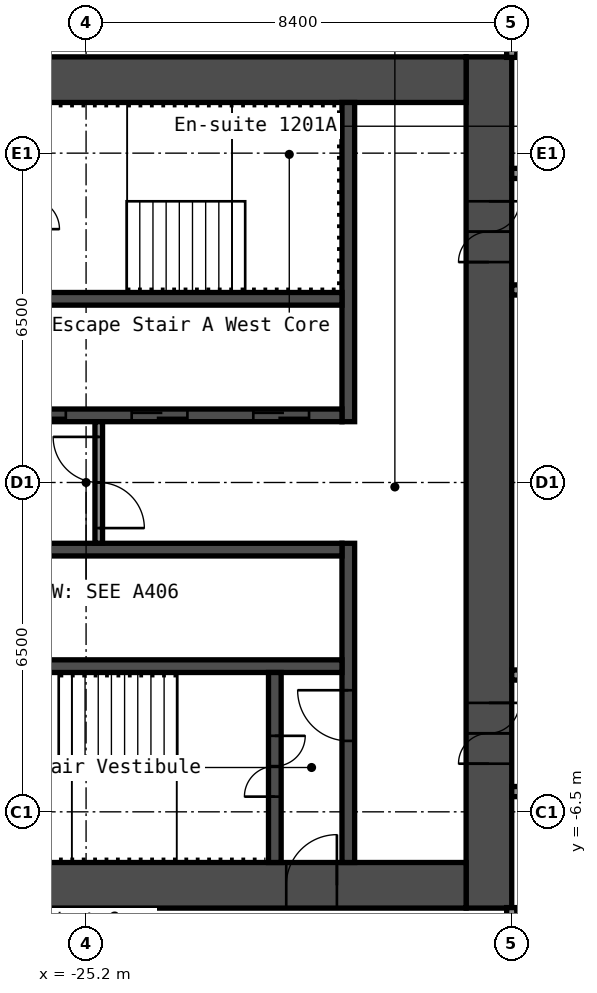
"""IFC4 building model, lengths in metres.
Left out: names, types, materials, properties, quantities, classifications, styles, units other than length and angle.
Written with IfcOpenShell. Run it as: python <this file> out.ifc"""

import sys

from ifc_helpers import new_model, si_unit, direction, frame, frame_2d, origin, place, context, subcontext, project, spatial, rectangle, extrude, element, fill, save


model = new_model("IFC4")
c1 = context("Model", 3, precision=1e-05, world=origin(), true_north=direction((0.0, 1.0)))
c2 = subcontext(c1, "Body", "Model", "MODEL_VIEW")
j1 = project(units=[si_unit("LENGTHUNIT", "METRE"), si_unit("PLANEANGLEUNIT", "RADIAN")], contexts=[c1])
p1 = place(None, origin())
s1 = spatial("IfcSite", under=j1, at=p1, CompositionType="ELEMENT")
p2 = place(p1, origin())
s2 = spatial("IfcBuilding", under=s1, at=p2, CompositionType="ELEMENT")
p3 = place(p2, frame((0.0, 0.0, 45.4)))
s3 = spatial("IfcBuildingStorey", under=s2, at=p3, CompositionType="ELEMENT", Elevation=45.4)
p4 = place(p3, frame((-17.25, -8.4, 0.0), z_axis=(0.0, 0.0, 1.0), x_axis=(0.0, 1.0, 0.0)))
e1 = element("IfcWall", 1, at=p4, inside=s3, PredefinedType="SHEAR", context=c2, shape_type="SweptSolid", body=[
    extrude(rectangle(XDim=16.8, YDim=0.9, at=frame_2d((8.4, 0.0))), origin(), (0.0, 0.0, 1.0), 2.8),
])
p5 = place(p4, frame((12.75, 0.0, 0.0)))
e2 = element("IfcOpeningElement", 2, at=p5, cuts=e1, PredefinedType="OPENING", context=c2, shape_type="SweptSolid", body=[
    extrude(rectangle(XDim=1.2, YDim=2.1, at=frame_2d((0.6, 1.05))), frame((0.0, 0.46, 0.0), z_axis=(0.0, -1.0, 0.0), x_axis=(1.0, 0.0, 0.0)), (0.0, 0.0, 1.0), 0.92),
])
p6 = place(p4, frame((2.85, 0.0, 0.0)))
e3 = element("IfcOpeningElement", 3, at=p6, cuts=e1, PredefinedType="OPENING", context=c2, shape_type="SweptSolid", body=[
    extrude(rectangle(XDim=1.2, YDim=2.1, at=frame_2d((0.6, 1.05))), frame((0.0, 0.46, 0.0), z_axis=(0.0, -1.0, 0.0), x_axis=(1.0, 0.0, 0.0)), (0.0, 0.0, 1.0), 0.92),
])
p7 = place(p3, frame((-32.7, 7.95, 0.0), z_axis=(0.0, 0.0, 1.0), x_axis=(1.0, 0.0, 0.0)))
e4 = element("IfcWall", 4, at=p7, inside=s3, PredefinedType="SHEAR", context=c2, shape_type="SweptSolid", body=[
    extrude(rectangle(XDim=15.0, YDim=0.9, at=frame_2d((7.5, 0.0))), origin(), (0.0, 0.0, 1.0), 2.8),
])
p8 = place(p7, frame((3.4, 0.0, 0.0)))
e5 = element("IfcOpeningElement", 5, at=p8, cuts=e4, PredefinedType="OPENING", context=c2, shape_type="SweptSolid", body=[
    extrude(rectangle(XDim=1.2, YDim=2.1, at=frame_2d((0.6, 1.05))), frame((0.0, 0.46, 0.0), z_axis=(0.0, -1.0, 0.0), x_axis=(1.0, 0.0, 0.0)), (0.0, 0.0, 1.0), 0.92),
])
p9 = place(p7, frame((0.75, 0.0, 0.0)))
e6 = element("IfcOpeningElement", 6, at=p9, cuts=e4, PredefinedType="OPENING", context=c2, shape_type="SweptSolid", body=[
    extrude(rectangle(XDim=0.9, YDim=2.1, at=frame_2d((0.45, 1.05))), frame((0.0, 0.46, 0.0), z_axis=(0.0, -1.0, 0.0), x_axis=(1.0, 0.0, 0.0)), (0.0, 0.0, 1.0), 0.92),
])
p10 = place(p3, frame((-32.7, -7.95, 0.0), z_axis=(0.0, 0.0, 1.0), x_axis=(1.0, 0.0, 0.0)))
e7 = element("IfcWall", 7, at=p10, inside=s3, PredefinedType="SHEAR", context=c2, shape_type="SweptSolid", body=[
    extrude(rectangle(XDim=15.0, YDim=0.9, at=frame_2d((7.5, 0.0))), origin(), (0.0, 0.0, 1.0), 2.8),
])
p11 = place(p10, frame((11.45, 0.0, 0.0)))
e8 = element("IfcOpeningElement", 8, at=p11, cuts=e7, PredefinedType="OPENING", context=c2, shape_type="SweptSolid", body=[
    extrude(rectangle(XDim=1.0, YDim=2.1, at=frame_2d((0.5, 1.05))), frame((0.0, 0.46, 0.0), z_axis=(0.0, -1.0, 0.0), x_axis=(1.0, 0.0, 0.0)), (0.0, 0.0, 1.0), 0.92),
])
p12 = place(p3, frame((-20.025, 1.2, 0.0), z_axis=(0.0, 0.0, 1.0), x_axis=(0.0, 1.0, 0.0)))
e9 = element("IfcWall", 9, at=p12, inside=s3, PredefinedType="SHEAR", context=c2, shape_type="SweptSolid", body=[
    extrude(rectangle(XDim=6.3, YDim=0.25, at=frame_2d((3.15, 0.0))), origin(), (0.0, 0.0, 1.0), 2.8),
])
p13 = place(p3, frame((-20.025, -7.5, 0.0), z_axis=(0.0, 0.0, 1.0), x_axis=(0.0, 1.0, 0.0)))
e10 = element("IfcWall", 10, at=p13, inside=s3, PredefinedType="SHEAR", context=c2, shape_type="SweptSolid", body=[
    extrude(rectangle(XDim=6.3, YDim=0.25, at=frame_2d((3.15, 0.0))), origin(), (0.0, 0.0, 1.0), 2.8),
])
p14 = place(p13, frame((2.4, 0.0, 0.0)))
e11 = element("IfcOpeningElement", 11, at=p14, cuts=e10, PredefinedType="OPENING", context=c2, shape_type="SweptSolid", body=[
    extrude(rectangle(XDim=1.0, YDim=2.1, at=frame_2d((0.5, 1.05))), frame((0.0, 0.135, 0.0), z_axis=(0.0, -1.0, 0.0), x_axis=(1.0, 0.0, 0.0)), (0.0, 0.0, 1.0), 0.27),
])
p15 = place(p3, frame((-27.65, 1.325, 0.0), z_axis=(0.0, 0.0, 1.0), x_axis=(1.0, 0.0, 0.0)))
e12 = element("IfcWall", 12, at=p15, inside=s3, PredefinedType="SHEAR", context=c2, shape_type="SweptSolid", body=[
    extrude(rectangle(XDim=7.5, YDim=0.25, at=frame_2d((3.75, 0.0))), origin(), (0.0, 0.0, 1.0), 2.8),
])
p16 = place(p15, frame((5.75, 0.0, 0.0)))
e13 = element("IfcOpeningElement", 13, at=p16, cuts=e12, PredefinedType="OPENING", context=c2, shape_type="SweptSolid", body=[
    extrude(rectangle(XDim=1.1, YDim=2.1, at=frame_2d((0.55, 1.05))), frame((0.0, 0.135, 0.0), z_axis=(0.0, -1.0, 0.0), x_axis=(1.0, 0.0, 0.0)), (0.0, 0.0, 1.0), 0.27),
])
p17 = place(p15, frame((3.35, 0.0, 0.0)))
e14 = element("IfcOpeningElement", 14, at=p17, cuts=e12, PredefinedType="OPENING", context=c2, shape_type="SweptSolid", body=[
    extrude(rectangle(XDim=1.1, YDim=2.1, at=frame_2d((0.55, 1.05))), frame((0.0, 0.135, 0.0), z_axis=(0.0, -1.0, 0.0), x_axis=(1.0, 0.0, 0.0)), (0.0, 0.0, 1.0), 0.27),
])
p18 = place(p15, frame((0.95, 0.0, 0.0)))
e15 = element("IfcOpeningElement", 15, at=p18, cuts=e12, PredefinedType="OPENING", context=c2, shape_type="SweptSolid", body=[
    extrude(rectangle(XDim=1.1, YDim=2.1, at=frame_2d((0.55, 1.05))), frame((0.0, 0.135, 0.0), z_axis=(0.0, -1.0, 0.0), x_axis=(1.0, 0.0, 0.0)), (0.0, 0.0, 1.0), 0.27),
])
for number, where, z_axis, x_axis in (
    (16, (-27.65, 3.625, 0.0), (0.0, 0.0, 1.0), (1.0, 0.0, 0.0)),
    (17, (-27.65, -1.325, 0.0), (0.0, 0.0, 1.0), (1.0, 0.0, 0.0)),
    (18, (-27.65, -3.625, 0.0), (0.0, 0.0, 1.0), (1.0, 0.0, 0.0)),
):
    element("IfcWall", number, at=place(p3, frame(where, z_axis=z_axis, x_axis=x_axis)), inside=s3, PredefinedType="SHEAR", context=c2, shape_type="SweptSolid", body=[
        extrude(rectangle(XDim=7.5, YDim=0.25, at=frame_2d((3.75, 0.0))), origin(), (0.0, 0.0, 1.0), 2.8),
    ])
p19 = place(p3, frame((-21.475, -7.5, 0.0), z_axis=(0.0, 0.0, 1.0), x_axis=(0.0, 1.0, 0.0)))
e19 = element("IfcWall", 19, at=p19, inside=s3, PredefinedType="SHEAR", context=c2, shape_type="SweptSolid", body=[
    extrude(rectangle(XDim=3.75, YDim=0.25, at=frame_2d((1.875, 0.0))), origin(), (0.0, 0.0, 1.0), 2.8),
])
p20 = place(p19, frame((1.3, 0.0, 0.0)))
e20 = element("IfcOpeningElement", 20, at=p20, cuts=e19, PredefinedType="OPENING", context=c2, shape_type="SweptSolid", body=[
    extrude(rectangle(XDim=1.2, YDim=2.1, at=frame_2d((0.6, 1.05))), frame((0.0, 0.135, 0.0), z_axis=(0.0, -1.0, 0.0), x_axis=(1.0, 0.0, 0.0)), (0.0, 0.0, 1.0), 0.27),
])
p21 = place(p3, frame((-24.95, -1.2, 0.0), z_axis=(0.0, 0.0, 1.0), x_axis=(0.0, 1.0, 0.0)))
e21 = element("IfcWall", 21, at=p21, inside=s3, PredefinedType="PARTITIONING", context=c2, shape_type="SweptSolid", body=[
    extrude(rectangle(XDim=2.4, YDim=0.15, at=frame_2d((1.2, 0.0))), origin(), (0.0, 0.0, 1.0), 2.8),
])
p22 = place(p21, frame((0.3, 0.0, 0.0)))
e22 = element("IfcOpeningElement", 22, at=p22, cuts=e21, PredefinedType="OPENING", context=c2, shape_type="SweptSolid", body=[
    extrude(rectangle(XDim=1.8, YDim=2.1, at=frame_2d((0.9, 1.05))), frame((0.0, 0.085, 0.0), z_axis=(0.0, -1.0, 0.0), x_axis=(1.0, 0.0, 0.0)), (0.0, 0.0, 1.0), 0.17),
])
p23 = place(p3, frame((-16.8, -6.1, 0.0), z_axis=(0.0, 0.0, 1.0), x_axis=(1.0, 0.0, 0.0)))
e23 = element("IfcWall", 23, at=p23, inside=s3, PredefinedType="PARTITIONING", context=c2, shape_type="SweptSolid", body=[
    extrude(rectangle(XDim=33.6, YDim=0.2, at=frame_2d((16.8, 0.0))), origin(), (0.0, 0.0, 1.0), 2.8),
])
p24 = place(p23, frame((2.85, 0.0, 0.0)))
e24 = element("IfcOpeningElement", 24, at=p24, cuts=e23, PredefinedType="OPENING", context=c2, shape_type="SweptSolid", body=[
    extrude(rectangle(XDim=1.0, YDim=2.1, at=frame_2d((0.5, 1.05))), frame((0.0, 0.11, 0.0), z_axis=(0.0, -1.0, 0.0), x_axis=(1.0, 0.0, 0.0)), (0.0, 0.0, 1.0), 0.22),
])
p25 = place(p23, frame((4.55, 0.0, 0.0)))
e25 = element("IfcOpeningElement", 25, at=p25, cuts=e23, PredefinedType="OPENING", context=c2, shape_type="SweptSolid", body=[
    extrude(rectangle(XDim=1.0, YDim=2.1, at=frame_2d((0.5, 1.05))), frame((0.0, 0.11, 0.0), z_axis=(0.0, -1.0, 0.0), x_axis=(1.0, 0.0, 0.0)), (0.0, 0.0, 1.0), 0.22),
])
p26 = place(p23, frame((10.3, 0.0, 0.0)))
e26 = element("IfcOpeningElement", 26, at=p26, cuts=e23, PredefinedType="OPENING", context=c2, shape_type="SweptSolid", body=[
    extrude(rectangle(XDim=0.9, YDim=2.1, at=frame_2d((0.45, 1.05))), frame((0.0, 0.11, 0.0), z_axis=(0.0, -1.0, 0.0), x_axis=(1.0, 0.0, 0.0)), (0.0, 0.0, 1.0), 0.22),
])
p27 = place(p23, frame((14.5, 0.0, 0.0)))
e27 = element("IfcOpeningElement", 27, at=p27, cuts=e23, PredefinedType="OPENING", context=c2, shape_type="SweptSolid", body=[
    extrude(rectangle(XDim=0.9, YDim=2.1, at=frame_2d((0.45, 1.05))), frame((0.0, 0.11, 0.0), z_axis=(0.0, -1.0, 0.0), x_axis=(1.0, 0.0, 0.0)), (0.0, 0.0, 1.0), 0.22),
])
p28 = place(p23, frame((19.65, 0.0, 0.0)))
e28 = element("IfcOpeningElement", 28, at=p28, cuts=e23, PredefinedType="OPENING", context=c2, shape_type="SweptSolid", body=[
    extrude(rectangle(XDim=1.0, YDim=2.1, at=frame_2d((0.5, 1.05))), frame((0.0, 0.11, 0.0), z_axis=(0.0, -1.0, 0.0), x_axis=(1.0, 0.0, 0.0)), (0.0, 0.0, 1.0), 0.22),
])
p29 = place(p23, frame((21.35, 0.0, 0.0)))
e29 = element("IfcOpeningElement", 29, at=p29, cuts=e23, PredefinedType="OPENING", context=c2, shape_type="SweptSolid", body=[
    extrude(rectangle(XDim=1.0, YDim=2.1, at=frame_2d((0.5, 1.05))), frame((0.0, 0.11, 0.0), z_axis=(0.0, -1.0, 0.0), x_axis=(1.0, 0.0, 0.0)), (0.0, 0.0, 1.0), 0.22),
])
p30 = place(p23, frame((30.6, 0.0, 0.0)))
e30 = element("IfcOpeningElement", 30, at=p30, cuts=e23, PredefinedType="OPENING", context=c2, shape_type="SweptSolid", body=[
    extrude(rectangle(XDim=1.0, YDim=2.1, at=frame_2d((0.5, 1.05))), frame((0.0, 0.11, 0.0), z_axis=(0.0, -1.0, 0.0), x_axis=(1.0, 0.0, 0.0)), (0.0, 0.0, 1.0), 0.22),
])
p31 = place(p3, frame((-16.8, -3.8, 0.0), z_axis=(0.0, 0.0, 1.0), x_axis=(1.0, 0.0, 0.0)))
e31 = element("IfcWall", 31, at=p31, inside=s3, PredefinedType="PARTITIONING", context=c2, shape_type="SweptSolid", body=[
    extrude(rectangle(XDim=33.6, YDim=0.2, at=frame_2d((16.8, 0.0))), origin(), (0.0, 0.0, 1.0), 2.8),
])
p32 = place(p31, frame((9.63, 0.0, 0.0)))
e32 = element("IfcOpeningElement", 32, at=p32, cuts=e31, PredefinedType="OPENING", context=c2, shape_type="SweptSolid", body=[
    extrude(rectangle(XDim=0.9, YDim=2.1, at=frame_2d((0.45, 1.05))), frame((0.0, 0.11, 0.0), z_axis=(0.0, -1.0, 0.0), x_axis=(1.0, 0.0, 0.0)), (0.0, 0.0, 1.0), 0.22),
])
p33 = place(p31, frame((13.83, 0.0, 0.0)))
e33 = element("IfcOpeningElement", 33, at=p33, cuts=e31, PredefinedType="OPENING", context=c2, shape_type="SweptSolid", body=[
    extrude(rectangle(XDim=0.9, YDim=2.1, at=frame_2d((0.45, 1.05))), frame((0.0, 0.11, 0.0), z_axis=(0.0, -1.0, 0.0), x_axis=(1.0, 0.0, 0.0)), (0.0, 0.0, 1.0), 0.22),
])
p34 = place(p31, frame((27.02, 0.0, 0.0)))
e34 = element("IfcOpeningElement", 34, at=p34, cuts=e31, PredefinedType="OPENING", context=c2, shape_type="SweptSolid", body=[
    extrude(rectangle(XDim=0.9, YDim=2.1, at=frame_2d((0.45, 1.05))), frame((0.0, 0.11, 0.0), z_axis=(0.0, -1.0, 0.0), x_axis=(1.0, 0.0, 0.0)), (0.0, 0.0, 1.0), 0.22),
])
p35 = place(p31, frame((31.22, 0.0, 0.0)))
e35 = element("IfcOpeningElement", 35, at=p35, cuts=e31, PredefinedType="OPENING", context=c2, shape_type="SweptSolid", body=[
    extrude(rectangle(XDim=0.9, YDim=2.1, at=frame_2d((0.45, 1.05))), frame((0.0, 0.11, 0.0), z_axis=(0.0, -1.0, 0.0), x_axis=(1.0, 0.0, 0.0)), (0.0, 0.0, 1.0), 0.22),
])
p36 = place(p3, frame((-16.8, 3.8, 0.0), z_axis=(0.0, 0.0, 1.0), x_axis=(1.0, 0.0, 0.0)))
e36 = element("IfcWall", 36, at=p36, inside=s3, PredefinedType="PARTITIONING", context=c2, shape_type="SweptSolid", body=[
    extrude(rectangle(XDim=33.6, YDim=0.2, at=frame_2d((16.8, 0.0))), origin(), (0.0, 0.0, 1.0), 2.8),
])
p37 = place(p36, frame((2.07, 0.0, 0.0)))
e37 = element("IfcOpeningElement", 37, at=p37, cuts=e36, PredefinedType="OPENING", context=c2, shape_type="SweptSolid", body=[
    extrude(rectangle(XDim=0.9, YDim=2.1, at=frame_2d((0.45, 1.05))), frame((0.0, 0.11, 0.0), z_axis=(0.0, -1.0, 0.0), x_axis=(1.0, 0.0, 0.0)), (0.0, 0.0, 1.0), 0.22),
])
p38 = place(p36, frame((6.27, 0.0, 0.0)))
e38 = element("IfcOpeningElement", 38, at=p38, cuts=e36, PredefinedType="OPENING", context=c2, shape_type="SweptSolid", body=[
    extrude(rectangle(XDim=0.9, YDim=2.1, at=frame_2d((0.45, 1.05))), frame((0.0, 0.11, 0.0), z_axis=(0.0, -1.0, 0.0), x_axis=(1.0, 0.0, 0.0)), (0.0, 0.0, 1.0), 0.22),
])
p39 = place(p36, frame((18.115, 0.0, 0.0)))
e39 = element("IfcOpeningElement", 39, at=p39, cuts=e36, PredefinedType="OPENING", context=c2, shape_type="SweptSolid", body=[
    extrude(rectangle(XDim=0.9, YDim=2.1, at=frame_2d((0.45, 1.05))), frame((0.0, 0.11, 0.0), z_axis=(0.0, -1.0, 0.0), x_axis=(1.0, 0.0, 0.0)), (0.0, 0.0, 1.0), 0.22),
])
p40 = place(p36, frame((22.315, 0.0, 0.0)))
e40 = element("IfcOpeningElement", 40, at=p40, cuts=e36, PredefinedType="OPENING", context=c2, shape_type="SweptSolid", body=[
    extrude(rectangle(XDim=0.9, YDim=2.1, at=frame_2d((0.45, 1.05))), frame((0.0, 0.11, 0.0), z_axis=(0.0, -1.0, 0.0), x_axis=(1.0, 0.0, 0.0)), (0.0, 0.0, 1.0), 0.22),
])
p41 = place(p3, frame((-16.8, 6.1, 0.0), z_axis=(0.0, 0.0, 1.0), x_axis=(1.0, 0.0, 0.0)))
e41 = element("IfcWall", 41, at=p41, inside=s3, PredefinedType="PARTITIONING", context=c2, shape_type="SweptSolid", body=[
    extrude(rectangle(XDim=33.6, YDim=0.2, at=frame_2d((16.8, 0.0))), origin(), (0.0, 0.0, 1.0), 2.8),
])
p42 = place(p41, frame((2.85, 0.0, 0.0)))
e42 = element("IfcOpeningElement", 42, at=p42, cuts=e41, PredefinedType="OPENING", context=c2, shape_type="SweptSolid", body=[
    extrude(rectangle(XDim=1.0, YDim=2.1, at=frame_2d((0.5, 1.05))), frame((0.0, 0.11, 0.0), z_axis=(0.0, -1.0, 0.0), x_axis=(1.0, 0.0, 0.0)), (0.0, 0.0, 1.0), 0.22),
])
p43 = place(p41, frame((4.55, 0.0, 0.0)))
e43 = element("IfcOpeningElement", 43, at=p43, cuts=e41, PredefinedType="OPENING", context=c2, shape_type="SweptSolid", body=[
    extrude(rectangle(XDim=1.0, YDim=2.1, at=frame_2d((0.5, 1.05))), frame((0.0, 0.11, 0.0), z_axis=(0.0, -1.0, 0.0), x_axis=(1.0, 0.0, 0.0)), (0.0, 0.0, 1.0), 0.22),
])
p44 = place(p41, frame((13.8, 0.0, 0.0)))
e44 = element("IfcOpeningElement", 44, at=p44, cuts=e41, PredefinedType="OPENING", context=c2, shape_type="SweptSolid", body=[
    extrude(rectangle(XDim=1.0, YDim=2.1, at=frame_2d((0.5, 1.05))), frame((0.0, 0.11, 0.0), z_axis=(0.0, -1.0, 0.0), x_axis=(1.0, 0.0, 0.0)), (0.0, 0.0, 1.0), 0.22),
])
p45 = place(p41, frame((18.7, 0.0, 0.0)))
e45 = element("IfcOpeningElement", 45, at=p45, cuts=e41, PredefinedType="OPENING", context=c2, shape_type="SweptSolid", body=[
    extrude(rectangle(XDim=1.0, YDim=2.1, at=frame_2d((0.5, 1.05))), frame((0.0, 0.11, 0.0), z_axis=(0.0, -1.0, 0.0), x_axis=(1.0, 0.0, 0.0)), (0.0, 0.0, 1.0), 0.22),
])
p46 = place(p41, frame((30.6, 0.0, 0.0)))
e46 = element("IfcOpeningElement", 46, at=p46, cuts=e41, PredefinedType="OPENING", context=c2, shape_type="SweptSolid", body=[
    extrude(rectangle(XDim=1.0, YDim=2.1, at=frame_2d((0.5, 1.05))), frame((0.0, 0.11, 0.0), z_axis=(0.0, -1.0, 0.0), x_axis=(1.0, 0.0, 0.0)), (0.0, 0.0, 1.0), 0.22),
])
for number, where, z_axis, x_axis in (
    (47, (-16.8, -20.3, 0.0), (0.0, 0.0, 1.0), (0.0, 1.0, 0.0)),
    (48, (-16.8, 8.39, 0.0), (0.0, 0.0, 1.0), (0.0, 1.0, 0.0)),
):
    element("IfcWall", number, at=place(p3, frame(where, z_axis=z_axis, x_axis=x_axis)), inside=s3, PredefinedType="PARTITIONING", context=c2, shape_type="SweptSolid", body=[
        extrude(rectangle(XDim=11.91, YDim=0.2, at=frame_2d((5.955, 0.0))), origin(), (0.0, 0.0, 1.0), 2.8),
    ])
p47 = place(p5, origin())
e49 = element("IfcDoor", 49, at=p47, inside=s3, OperationType="DOUBLE_DOOR_SINGLE_SWING", PredefinedType="DOOR", context=c2, shape_type="SweptSolid", body=[
    extrude(rectangle(XDim=1.2, YDim=2.1, at=frame_2d((0.6, 1.05))), frame((0.0, 0.025, 0.0), z_axis=(0.0, -1.0, 0.0), x_axis=(1.0, 0.0, 0.0)), (0.0, 0.0, 1.0), 0.05),
])
fill(e2, e49)
p48 = place(p6, origin())
e50 = element("IfcDoor", 50, at=p48, inside=s3, OperationType="DOUBLE_DOOR_SINGLE_SWING", PredefinedType="DOOR", context=c2, shape_type="SweptSolid", body=[
    extrude(rectangle(XDim=1.2, YDim=2.1, at=frame_2d((0.6, 1.05))), frame((0.0, 0.025, 0.0), z_axis=(0.0, -1.0, 0.0), x_axis=(1.0, 0.0, 0.0)), (0.0, 0.0, 1.0), 0.05),
])
fill(e3, e50)
p49 = place(p11, origin())
e51 = element("IfcDoor", 51, at=p49, inside=s3, OperationType="SINGLE_SWING_LEFT", PredefinedType="DOOR", context=c2, shape_type="SweptSolid", body=[
    extrude(rectangle(XDim=1.0, YDim=2.1, at=frame_2d((0.5, 1.05))), frame((0.0, 0.025, 0.0), z_axis=(0.0, -1.0, 0.0), x_axis=(1.0, 0.0, 0.0)), (0.0, 0.0, 1.0), 0.05),
])
fill(e8, e51)
p50 = place(p20, origin())
e52 = element("IfcDoor", 52, at=p50, inside=s3, OperationType="DOUBLE_DOOR_SINGLE_SWING", PredefinedType="DOOR", context=c2, shape_type="SweptSolid", body=[
    extrude(rectangle(XDim=1.2, YDim=2.1, at=frame_2d((0.6, 1.05))), frame((0.0, 0.025, 0.0), z_axis=(0.0, -1.0, 0.0), x_axis=(1.0, 0.0, 0.0)), (0.0, 0.0, 1.0), 0.05),
])
fill(e20, e52)
p51 = place(p14, origin())
e53 = element("IfcDoor", 53, at=p51, inside=s3, OperationType="SINGLE_SWING_LEFT", PredefinedType="DOOR", context=c2, shape_type="SweptSolid", body=[
    extrude(rectangle(XDim=1.0, YDim=2.1, at=frame_2d((0.5, 1.05))), frame((0.0, 0.025, 0.0), z_axis=(0.0, -1.0, 0.0), x_axis=(1.0, 0.0, 0.0)), (0.0, 0.0, 1.0), 0.05),
])
fill(e11, e53)
p52 = place(p22, origin())
e54 = element("IfcDoor", 54, at=p52, inside=s3, OperationType="DOUBLE_DOOR_SINGLE_SWING", PredefinedType="DOOR", context=c2, shape_type="SweptSolid", body=[
    extrude(rectangle(XDim=1.8, YDim=2.1, at=frame_2d((0.9, 1.05))), frame((0.0, 0.025, 0.0), z_axis=(0.0, -1.0, 0.0), x_axis=(1.0, 0.0, 0.0)), (0.0, 0.0, 1.0), 0.05),
])
fill(e22, e54)
p53 = place(p16, origin())
e55 = element("IfcDoor", 55, at=p53, inside=s3, OperationType="DOUBLE_DOOR_SLIDING", PredefinedType="DOOR", context=c2, shape_type="SweptSolid", body=[
    extrude(rectangle(XDim=1.1, YDim=2.1, at=frame_2d((0.55, 1.05))), frame((0.0, 0.025, 0.0), z_axis=(0.0, -1.0, 0.0), x_axis=(1.0, 0.0, 0.0)), (0.0, 0.0, 1.0), 0.05),
])
fill(e13, e55)
p54 = place(p17, origin())
e56 = element("IfcDoor", 56, at=p54, inside=s3, OperationType="DOUBLE_DOOR_SLIDING", PredefinedType="DOOR", context=c2, shape_type="SweptSolid", body=[
    extrude(rectangle(XDim=1.1, YDim=2.1, at=frame_2d((0.55, 1.05))), frame((0.0, 0.025, 0.0), z_axis=(0.0, -1.0, 0.0), x_axis=(1.0, 0.0, 0.0)), (0.0, 0.0, 1.0), 0.05),
])
fill(e14, e56)
p55 = place(p18, origin())
e57 = element("IfcDoor", 57, at=p55, inside=s3, OperationType="DOUBLE_DOOR_SLIDING", PredefinedType="DOOR", context=c2, shape_type="SweptSolid", body=[
    extrude(rectangle(XDim=1.1, YDim=2.1, at=frame_2d((0.55, 1.05))), frame((0.0, 0.025, 0.0), z_axis=(0.0, -1.0, 0.0), x_axis=(1.0, 0.0, 0.0)), (0.0, 0.0, 1.0), 0.05),
])
fill(e15, e57)
save(model, sys.argv[1])
